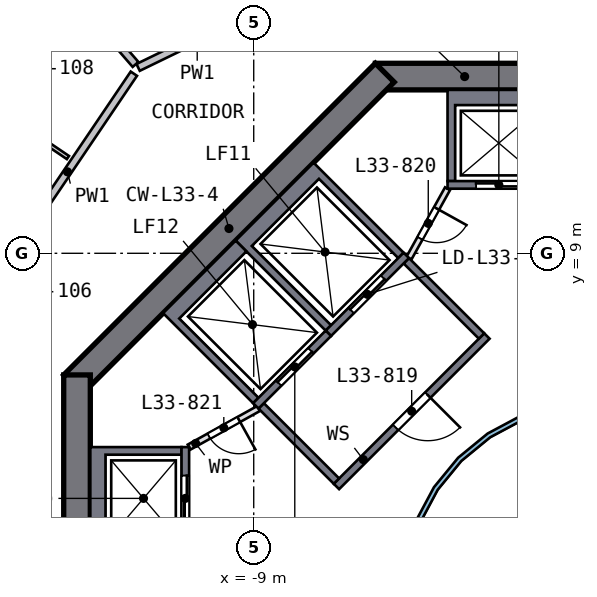
"""IFC4 building model, lengths in metres.
Left out: names, types, materials, properties, quantities, classifications, styles, units other than length and angle.
Written with IfcOpenShell. Run it as: python <this file> out.ifc"""

import sys

from ifc_helpers import new_model, si_unit, direction, frame, frame_2d, origin, place, context, subcontext, project, spatial, polyline, rectangle, outline, extrude, element, fill, save


model = new_model("IFC4")
c1 = context("Model", 3, precision=1e-05, world=origin(), true_north=direction((0.0, 1.0)))
c2 = subcontext(c1, "Body", "Model", "MODEL_VIEW")
j1 = project(units=[si_unit("LENGTHUNIT", "METRE"), si_unit("PLANEANGLEUNIT", "RADIAN")], contexts=[c1])
p1 = place(None, origin())
s1 = spatial("IfcSite", under=j1, at=p1, CompositionType="ELEMENT")
p2 = place(p1, origin())
s2 = spatial("IfcBuilding", under=s1, at=p2, CompositionType="ELEMENT")
p3 = place(p2, frame((0.0, 0.0, 140.0)))
s3 = spatial("IfcBuildingStorey", under=s2, at=p3, CompositionType="ELEMENT", Elevation=140.0)
p4 = place(p3, frame((5.799, 13.65, 0.0), z_axis=(0.0, 0.0, 1.0), x_axis=(-1.0, 0.0, 0.0)))
e1 = element("IfcWall", 1, at=p4, inside=s3, PredefinedType="SHEAR", context=c2, shape_type="SweptSolid", body=[
    extrude(rectangle(XDim=11.598, YDim=0.7, at=frame_2d((5.799, 0.0))), origin(), (0.0, 0.0, 1.0), 3.5),
])
p5 = place(p4, frame((4.899, 0.0, 0.0)))
e2 = element("IfcOpeningElement", 2, at=p5, cuts=e1, PredefinedType="OPENING", context=c2, shape_type="SweptSolid", body=[
    extrude(rectangle(XDim=1.8, YDim=2.1, at=frame_2d((0.9, 1.05))), frame((0.0, 0.36, 0.0), z_axis=(0.0, -1.0, 0.0), x_axis=(1.0, 0.0, 0.0)), (0.0, 0.0, 1.0), 0.72),
])
p6 = place(p3, frame((-5.552, 13.752, 0.0), z_axis=(0.0, 0.0, 1.0), x_axis=(-0.707106781, -0.707106781, 0.0)))
e3 = element("IfcWall", 3, at=p6, inside=s3, PredefinedType="SHEAR", context=c2, shape_type="SweptSolid", body=[
    extrude(rectangle(XDim=11.598, YDim=0.7, at=frame_2d((5.799, 0.0))), origin(), (0.0, 0.0, 1.0), 3.5),
])
p7 = place(p3, frame((-13.65, 5.799, 0.0), z_axis=(0.0, 0.0, 1.0), x_axis=(0.0, -1.0, 0.0)))
e4 = element("IfcWall", 4, at=p7, inside=s3, PredefinedType="SHEAR", context=c2, shape_type="SweptSolid", body=[
    extrude(rectangle(XDim=11.598, YDim=0.7, at=frame_2d((5.799, 0.0))), origin(), (0.0, 0.0, 1.0), 3.5),
])
p8 = place(p7, frame((4.899, 0.0, 0.0)))
e5 = element("IfcOpeningElement", 5, at=p8, cuts=e4, PredefinedType="OPENING", context=c2, shape_type="SweptSolid", body=[
    extrude(rectangle(XDim=1.8, YDim=2.1, at=frame_2d((0.9, 1.05))), frame((0.0, 0.36, 0.0), z_axis=(0.0, -1.0, 0.0), x_axis=(1.0, 0.0, 0.0)), (0.0, 0.0, 1.0), 0.72),
])
p9 = place(p3, origin())
e6 = element("IfcWall", 6, at=p9, inside=s3, PredefinedType="SOLIDWALL", context=c2, shape_type="SweptSolid", body=[
    extrude(outline(polyline([(-3.9, 10.9), (-3.9, 13.3), (-1.2, 13.3), (-1.2, 10.9), (-1.4, 10.9), (-1.4, 12.9), (-3.7, 12.9), (-3.7, 10.9), (-3.9, 10.9)])), origin(), (0.0, 0.0, 1.0), 3.19),
])
p10 = place(p3, frame((-1.2, 10.8, 0.0), z_axis=(0.0, 0.0, 1.0), x_axis=(-1.0, 0.0, 0.0)))
e7 = element("IfcWall", 7, at=p10, inside=s3, PredefinedType="SOLIDWALL", context=c2, shape_type="SweptSolid", body=[
    extrude(rectangle(XDim=2.7, YDim=0.2, at=frame_2d((1.35, 0.0))), origin(), (0.0, 0.0, 1.0), 3.19),
])
p11 = place(p10, frame((0.75, 0.0, 0.0)))
e8 = element("IfcOpeningElement", 8, at=p11, cuts=e7, PredefinedType="OPENING", context=c2, shape_type="SweptSolid", body=[
    extrude(rectangle(XDim=1.2, YDim=2.1, at=frame_2d((0.6, 1.05))), frame((0.0, 0.11, 0.0), z_axis=(0.0, -1.0, 0.0), x_axis=(1.0, 0.0, 0.0)), (0.0, 0.0, 1.0), 0.22),
])
p12 = place(p3, origin())
e9 = element("IfcWall", 9, at=p12, inside=s3, PredefinedType="SOLIDWALL", context=c2, shape_type="SweptSolid", body=[
    extrude(outline(polyline([(-13.3, 3.9), (-10.9, 3.9), (-10.9, 3.7), (-12.9, 3.7), (-12.9, 1.4), (-10.9, 1.4), (-10.9, 1.2), (-13.3, 1.2), (-13.3, 3.9)])), origin(), (0.0, 0.0, 1.0), 3.19),
])
p13 = place(p3, frame((-10.8, 1.2, 0.0), z_axis=(0.0, 0.0, 1.0), x_axis=(0.0, 1.0, 0.0)))
e10 = element("IfcWall", 10, at=p13, inside=s3, PredefinedType="SOLIDWALL", context=c2, shape_type="SweptSolid", body=[
    extrude(rectangle(XDim=2.7, YDim=0.2, at=frame_2d((1.35, 0.0))), origin(), (0.0, 0.0, 1.0), 3.19),
])
p14 = place(p13, frame((0.75, 0.0, 0.0)))
e11 = element("IfcOpeningElement", 11, at=p14, cuts=e10, PredefinedType="OPENING", context=c2, shape_type="SweptSolid", body=[
    extrude(rectangle(XDim=1.2, YDim=2.1, at=frame_2d((0.6, 1.05))), frame((0.0, 0.11, 0.0), z_axis=(0.0, -1.0, 0.0), x_axis=(1.0, 0.0, 0.0)), (0.0, 0.0, 1.0), 0.22),
])
p15 = place(p3, origin())
e12 = element("IfcWall", 12, at=p15, inside=s3, PredefinedType="SOLIDWALL", context=c2, shape_type="SweptSolid", body=[
    extrude(outline(polyline([(-9.475, 9.334), (-7.425, 11.385), (-5.056, 9.016), (-5.197, 8.874), (-7.283, 10.96), (-9.051, 9.192), (-6.965, 7.106), (-7.106, 6.965), (-9.475, 9.334)])), origin(), (0.0, 0.0, 1.0), 3.19),
])
p16 = place(p3, frame((-4.985, 8.945, 0.0), z_axis=(0.0, 0.0, 1.0), x_axis=(-0.707106781, -0.707106781, 0.0)))
e13 = element("IfcWall", 13, at=p16, inside=s3, PredefinedType="SOLIDWALL", context=c2, shape_type="SweptSolid", body=[
    extrude(rectangle(XDim=2.9, YDim=0.2, at=frame_2d((1.45, 0.0))), origin(), (0.0, 0.0, 1.0), 3.19),
])
p17 = place(p16, frame((0.85, 0.0, 0.0)))
e14 = element("IfcOpeningElement", 14, at=p17, cuts=e13, PredefinedType="OPENING", context=c2, shape_type="SweptSolid", body=[
    extrude(rectangle(XDim=1.2, YDim=2.1, at=frame_2d((0.6, 1.05))), frame((0.0, 0.11, 0.0), z_axis=(0.0, -1.0, 0.0), x_axis=(1.0, 0.0, 0.0)), (0.0, 0.0, 1.0), 0.22),
])
p18 = place(p3, origin())
e15 = element("IfcWall", 15, at=p18, inside=s3, PredefinedType="SOLIDWALL", context=c2, shape_type="SweptSolid", body=[
    extrude(outline(polyline([(-11.385, 7.425), (-9.475, 9.334), (-9.192, 9.051), (-10.96, 7.283), (-8.874, 5.197), (-9.016, 5.056), (-11.385, 7.425)])), origin(), (0.0, 0.0, 1.0), 3.19),
])
p19 = place(p3, frame((-7.036, 6.894, 0.0), z_axis=(0.0, 0.0, 1.0), x_axis=(-0.707106781, -0.707106781, 0.0)))
e16 = element("IfcWall", 16, at=p19, inside=s3, PredefinedType="SOLIDWALL", context=c2, shape_type="SweptSolid", body=[
    extrude(rectangle(XDim=2.7, YDim=0.2, at=frame_2d((1.35, 0.0))), origin(), (0.0, 0.0, 1.0), 3.19),
])
p20 = place(p19, frame((0.65, 0.0, 0.0)))
e17 = element("IfcOpeningElement", 17, at=p20, cuts=e16, PredefinedType="OPENING", context=c2, shape_type="SweptSolid", body=[
    extrude(rectangle(XDim=1.2, YDim=2.1, at=frame_2d((0.6, 1.05))), frame((0.0, 0.11, 0.0), z_axis=(0.0, -1.0, 0.0), x_axis=(1.0, 0.0, 0.0)), (0.0, 0.0, 1.0), 0.22),
])
p21 = place(p3, frame((-2.864, 6.823, 0.0), z_axis=(0.0, 0.0, 1.0), x_axis=(-0.707106781, -0.707106781, 0.0)))
e18 = element("IfcWall", 18, at=p21, inside=s3, PredefinedType="SOLIDWALL", context=c2, shape_type="SweptSolid", body=[
    extrude(rectangle(XDim=5.6, YDim=0.2, at=frame_2d((2.8, 0.0))), origin(), (0.0, 0.0, 1.0), 3.19),
])
p22 = place(p21, frame((2.2, 0.0, 0.0)))
e19 = element("IfcOpeningElement", 19, at=p22, cuts=e18, PredefinedType="OPENING", context=c2, shape_type="SweptSolid", body=[
    extrude(rectangle(XDim=1.2, YDim=2.1, at=frame_2d((0.6, 1.05))), frame((0.0, 0.11, 0.0), z_axis=(0.0, -1.0, 0.0), x_axis=(1.0, 0.0, 0.0)), (0.0, 0.0, 1.0), 0.22),
])
for number, where, z_axis, x_axis in (
    (20, (-3.005, 6.823, 0.0), (0.0, 0.0, 1.0), (-0.707, 0.707, 0.0)),
    (21, (-6.823, 3.005, 0.0), (0.0, 0.0, 1.0), (-0.707, 0.707, 0.0)),
):
    element("IfcWall", number, at=place(p3, frame(where, z_axis=z_axis, x_axis=x_axis)), inside=s3, PredefinedType="SOLIDWALL", context=c2, shape_type="SweptSolid", body=[
        extrude(rectangle(XDim=2.8, YDim=0.2, at=frame_2d((1.4, 0.0))), origin(), (0.0, 0.0, 1.0), 3.19),
    ])
p23 = place(p3, frame((-3.9, 10.7, 0.0), z_axis=(0.0, 0.0, 1.0), x_axis=(-0.485692555, -0.874129705, 0.0)))
e22 = element("IfcWall", 22, at=p23, inside=s3, PredefinedType="PARTITIONING", context=c2, shape_type="SweptSolid", body=[
    extrude(rectangle(XDim=2.089, YDim=0.15, at=frame_2d((1.044, 0.0))), origin(), (0.0, 0.0, 1.0), 3.19),
])
p24 = place(p23, frame((0.594, 0.0, 0.0)))
e23 = element("IfcOpeningElement", 23, at=p24, cuts=e22, PredefinedType="OPENING", context=c2, shape_type="SweptSolid", body=[
    extrude(rectangle(XDim=0.9, YDim=2.1, at=frame_2d((0.45, 1.05))), frame((0.0, 0.085, 0.0), z_axis=(0.0, -1.0, 0.0), x_axis=(1.0, 0.0, 0.0)), (0.0, 0.0, 1.0), 0.17),
])
p25 = place(p3, frame((-8.874, 4.914, 0.0), z_axis=(0.0, 0.0, 1.0), x_axis=(-0.874129705, -0.485692555, 0.0)))
e24 = element("IfcWall", 24, at=p25, inside=s3, PredefinedType="PARTITIONING", context=c2, shape_type="SweptSolid", body=[
    extrude(rectangle(XDim=2.089, YDim=0.15, at=frame_2d((1.044, 0.0))), origin(), (0.0, 0.0, 1.0), 3.19),
])
p26 = place(p25, frame((0.594, 0.0, 0.0)))
e25 = element("IfcOpeningElement", 25, at=p26, cuts=e24, PredefinedType="OPENING", context=c2, shape_type="SweptSolid", body=[
    extrude(rectangle(XDim=0.9, YDim=2.1, at=frame_2d((0.45, 1.05))), frame((0.0, 0.085, 0.0), z_axis=(0.0, -1.0, 0.0), x_axis=(1.0, 0.0, 0.0)), (0.0, 0.0, 1.0), 0.17),
])
p27 = place(p3, origin())
e26 = element("IfcWall", 26, at=p27, inside=s3, PredefinedType="SOLIDWALL", context=c2, shape_type="SweptSolid", body=[
    extrude(outline(polyline([(5.021, -0.999), (4.73, -1.959), (4.257, -2.844), (3.62, -3.62), (2.844, -4.257), (1.959, -4.73), (0.999, -5.021), (0.0, -5.12), (-0.999, -5.021), (-1.959, -4.73), (-2.844, -4.257), (-3.62, -3.62), (-4.257, -2.844), (-4.73, -1.959), (-5.021, -0.999), (-5.12, 0.0), (-5.021, 0.999), (-4.73, 1.959), (-4.257, 2.844), (-3.62, 3.62), (-2.844, 4.257), (-1.959, 4.73), (-0.999, 5.021), (0.0, 5.12), (0.999, 5.021), (1.959, 4.73), (2.844, 4.257), (3.62, 3.62), (4.257, 2.844), (4.73, 1.959), (5.021, 0.999), (5.12, 0.0), (5.021, -0.999)]), holes=[polyline([(4.904, 0.976), (4.619, 1.913), (4.157, 2.778), (3.535, 3.535), (2.778, 4.157), (1.913, 4.619), (0.976, 4.904), (0.0, 5.0), (-0.976, 4.904), (-1.913, 4.619), (-2.778, 4.157), (-3.535, 3.535), (-4.157, 2.778), (-4.619, 1.913), (-4.904, 0.976), (-5.0, 0.0), (-4.904, -0.976), (-4.619, -1.913), (-4.157, -2.778), (-3.535, -3.535), (-2.778, -4.157), (-1.913, -4.619), (-0.976, -4.904), (0.0, -5.0), (0.976, -4.904), (1.913, -4.619), (2.778, -4.157), (3.535, -3.535), (4.157, -2.778), (4.619, -1.913), (4.904, -0.976), (5.0, 0.0), (4.904, 0.976)])]), origin(), (0.0, 0.0, 1.0), 3.19),
])
p28 = place(p3, frame((-17.386, 5.993, 0.0), z_axis=(0.0, 0.0, 1.0), x_axis=(0.560341553, 0.82826164, 0.0)))
e27 = element("IfcWall", 27, at=p28, inside=s3, PredefinedType="SOLIDWALL", context=c2, shape_type="SweptSolid", body=[
    extrude(rectangle(XDim=9.337, YDim=0.2, at=frame_2d((4.668, 0.0))), origin(), (0.0, 0.0, 1.0), 3.19),
])
p29 = place(p28, frame((1.9, 0.0, 0.0)))
e28 = element("IfcOpeningElement", 28, at=p29, cuts=e27, PredefinedType="OPENING", context=c2, shape_type="SweptSolid", body=[
    extrude(rectangle(XDim=1.0, YDim=2.1, at=frame_2d((0.5, 1.05))), frame((0.0, 0.11, 0.0), z_axis=(0.0, -1.0, 0.0), x_axis=(1.0, 0.0, 0.0)), (0.0, 0.0, 1.0), 0.22),
])
p30 = place(p3, frame((-8.932, 15.404, 0.0), z_axis=(0.0, 0.0, 1.0), x_axis=(-0.899397153, -0.437132431, 0.0)))
e29 = element("IfcWall", 29, at=p30, inside=s3, PredefinedType="SOLIDWALL", context=c2, shape_type="SweptSolid", body=[
    extrude(rectangle(XDim=3.458, YDim=0.2, at=frame_2d((1.729, 0.0))), origin(), (0.0, 0.0, 1.0), 3.19),
])
p31 = place(p3, frame((-12.11, 13.97, 0.0), z_axis=(0.0, 0.0, 1.0), x_axis=(-0.655039289, 0.755594819, 0.0)))
e30 = element("IfcWall", 30, at=p31, inside=s3, PredefinedType="SOLIDWALL", context=c2, shape_type="SweptSolid", body=[
    extrude(rectangle(XDim=3.418, YDim=0.2, at=frame_2d((1.709, 0.0))), origin(), (0.0, 0.0, 1.0), 3.19),
])
p32 = place(p3, frame((-16.456, 13.256, 0.0), z_axis=(0.0, 0.0, 1.0), x_axis=(0.828238258, -0.560376113, 0.0)))
e31 = element("IfcWall", 31, at=p32, inside=s3, PredefinedType="PARTITIONING", context=c2, shape_type="SweptSolid", body=[
    extrude(rectangle(XDim=3.1, YDim=0.1, at=frame_2d((1.55, 0.0))), origin(), (0.0, 0.0, 1.0), 3.19),
])
p33 = place(p32, frame((1.15, 0.0, 0.0)))
e32 = element("IfcOpeningElement", 32, at=p33, cuts=e31, PredefinedType="OPENING", context=c2, shape_type="SweptSolid", body=[
    extrude(rectangle(XDim=0.9, YDim=2.1, at=frame_2d((0.45, 1.05))), frame((0.0, 0.06, 0.0), z_axis=(0.0, -1.0, 0.0), x_axis=(1.0, 0.0, 0.0)), (0.0, 0.0, 1.0), 0.12),
])
p34 = place(p11, origin())
e33 = element("IfcDoor", 33, at=p34, inside=s3, OperationType="DOUBLE_DOOR_SLIDING", PredefinedType="DOOR", context=c2, shape_type="SweptSolid", body=[
    extrude(rectangle(XDim=1.2, YDim=2.1, at=frame_2d((0.6, 1.05))), frame((0.0, 0.025, 0.0), z_axis=(0.0, -1.0, 0.0), x_axis=(1.0, 0.0, 0.0)), (0.0, 0.0, 1.0), 0.05),
])
fill(e8, e33)
p35 = place(p14, origin())
e34 = element("IfcDoor", 34, at=p35, inside=s3, OperationType="DOUBLE_DOOR_SLIDING", PredefinedType="DOOR", context=c2, shape_type="SweptSolid", body=[
    extrude(rectangle(XDim=1.2, YDim=2.1, at=frame_2d((0.6, 1.05))), frame((0.0, 0.025, 0.0), z_axis=(0.0, -1.0, 0.0), x_axis=(1.0, 0.0, 0.0)), (0.0, 0.0, 1.0), 0.05),
])
fill(e11, e34)
p36 = place(p17, origin())
e35 = element("IfcDoor", 35, at=p36, inside=s3, OperationType="DOUBLE_DOOR_SLIDING", PredefinedType="DOOR", context=c2, shape_type="SweptSolid", body=[
    extrude(rectangle(XDim=1.2, YDim=2.1, at=frame_2d((0.6, 1.05))), frame((0.0, 0.025, 0.0), z_axis=(0.0, -1.0, 0.0), x_axis=(1.0, 0.0, 0.0)), (0.0, 0.0, 1.0), 0.05),
])
fill(e14, e35)
p37 = place(p20, origin())
e36 = element("IfcDoor", 36, at=p37, inside=s3, OperationType="DOUBLE_DOOR_SLIDING", PredefinedType="DOOR", context=c2, shape_type="SweptSolid", body=[
    extrude(rectangle(XDim=1.2, YDim=2.1, at=frame_2d((0.6, 1.05))), frame((0.0, 0.025, 0.0), z_axis=(0.0, -1.0, 0.0), x_axis=(1.0, 0.0, 0.0)), (0.0, 0.0, 1.0), 0.05),
])
fill(e17, e36)
p38 = place(p22, origin())
e37 = element("IfcDoor", 37, at=p38, inside=s3, OperationType="SINGLE_SWING_LEFT", PredefinedType="DOOR", context=c2, shape_type="SweptSolid", body=[
    extrude(rectangle(XDim=1.2, YDim=2.1, at=frame_2d((0.6, 1.05))), frame((0.0, 0.025, 0.0), z_axis=(0.0, -1.0, 0.0), x_axis=(1.0, 0.0, 0.0)), (0.0, 0.0, 1.0), 0.05),
])
fill(e19, e37)
p39 = place(p24, origin())
e38 = element("IfcDoor", 38, at=p39, inside=s3, OperationType="SINGLE_SWING_LEFT", PredefinedType="DOOR", context=c2, shape_type="SweptSolid", body=[
    extrude(rectangle(XDim=0.9, YDim=2.1, at=frame_2d((0.45, 1.05))), frame((0.0, 0.025, 0.0), z_axis=(0.0, -1.0, 0.0), x_axis=(1.0, 0.0, 0.0)), (0.0, 0.0, 1.0), 0.05),
])
fill(e23, e38)
p40 = place(p26, origin())
e39 = element("IfcDoor", 39, at=p40, inside=s3, OperationType="SINGLE_SWING_LEFT", PredefinedType="DOOR", context=c2, shape_type="SweptSolid", body=[
    extrude(rectangle(XDim=0.9, YDim=2.1, at=frame_2d((0.45, 1.05))), frame((0.0, 0.025, 0.0), z_axis=(0.0, -1.0, 0.0), x_axis=(1.0, 0.0, 0.0)), (0.0, 0.0, 1.0), 0.05),
])
fill(e25, e39)
save(model, sys.argv[1])
